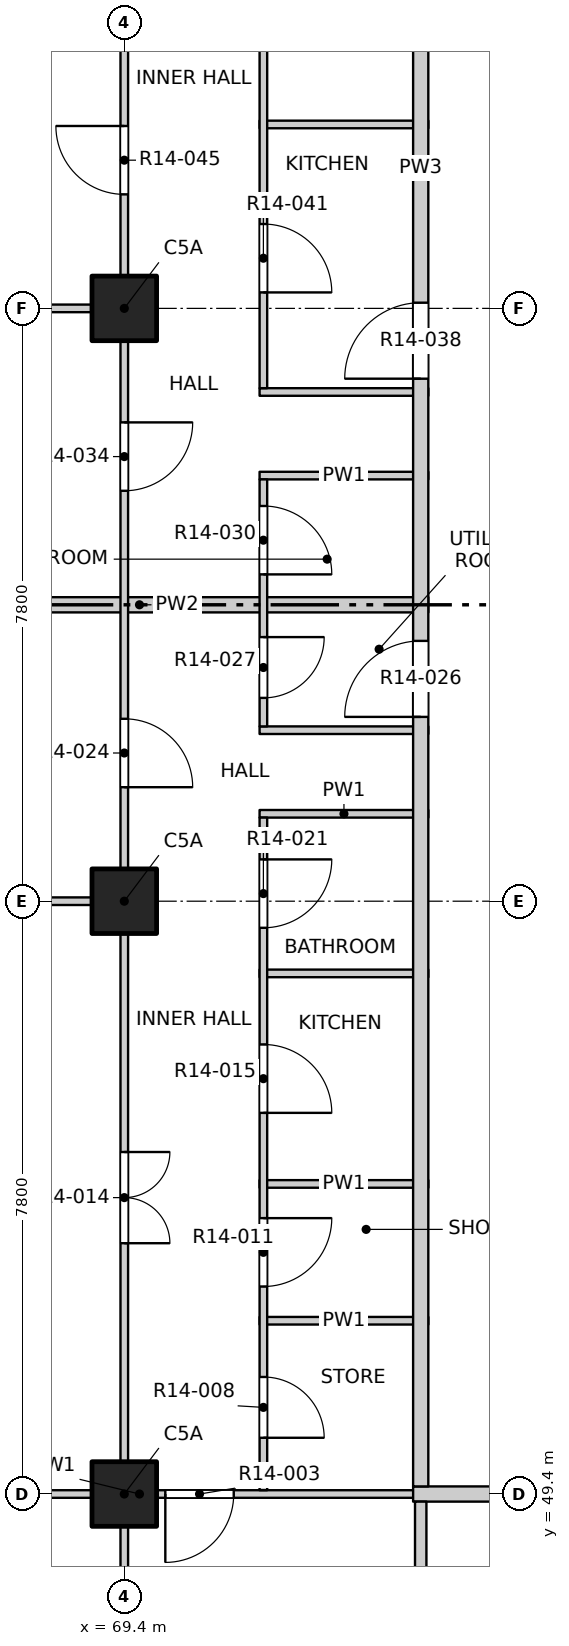
"""IFC4 building model, lengths in metres.
Left out: names, types, materials, properties, quantities, classifications, styles, units other than length and angle.
Written with IfcOpenShell. Run it as: python <this file> out.ifc"""

import sys

from ifc_helpers import new_model, si_unit, direction, frame, frame_2d, origin, origin_2d, place, context, subcontext, project, spatial, rectangle, extrude, element, fill, save


model = new_model("IFC4")
c1 = context("Model", 3, precision=1e-05, world=origin(), true_north=direction((0.0, 1.0)))
c2 = subcontext(c1, "Body", "Model", "MODEL_VIEW")
j1 = project(units=[si_unit("LENGTHUNIT", "METRE"), si_unit("PLANEANGLEUNIT", "RADIAN")], contexts=[c1])
p1 = place(None, origin())
s1 = spatial("IfcSite", under=j1, at=p1, CompositionType="ELEMENT")
p2 = place(p1, origin())
s2 = spatial("IfcBuilding", under=s1, at=p2, CompositionType="ELEMENT")
p3 = place(p2, frame((0.0, 0.0, 148.6)))
s3 = spatial("IfcBuildingStorey", under=s2, at=p3, CompositionType="ELEMENT", Elevation=148.6)
for number, where, z_axis, x_axis in (
    (1, (69.4, 49.4, -0.3), (0.0, 0.0, 1.0), (1.0, 0.0, 0.0)),
    (2, (69.4, 57.2, -0.3), (0.0, 0.0, 1.0), (1.0, 0.0, 0.0)),
    (3, (69.4, 65.0, -0.3), (0.0, 0.0, 1.0), (1.0, 0.0, 0.0)),
):
    element("IfcColumn", number, at=place(p3, frame(where, z_axis=z_axis, x_axis=x_axis)), inside=s3, PredefinedType="COLUMN", context=c2, shape_type="SweptSolid", body=[
        extrude(rectangle(XDim=0.85, YDim=0.85, at=origin_2d()), origin(), (0.0, 0.0, 1.0), 3.45),
    ])
p4 = place(p3, frame((65.8, 49.4, 0.0), z_axis=(0.0, 0.0, 1.0), x_axis=(1.0, 0.0, 0.0)))
e4 = element("IfcWall", 4, at=p4, inside=s3, PredefinedType="PARTITIONING", context=c2, shape_type="SweptSolid", body=[
    extrude(rectangle(XDim=7.6, YDim=0.1, at=frame_2d((3.8, 0.0))), origin(), (0.0, 0.0, 1.0), 3.15),
])
p5 = place(p4, frame((4.14, 0.0, 0.0)))
e5 = element("IfcOpeningElement", 5, at=p5, cuts=e4, PredefinedType="OPENING", context=c2, shape_type="SweptSolid", body=[
    extrude(rectangle(XDim=0.9, YDim=2.1, at=frame_2d((0.45, 1.05))), frame((0.0, 0.06, 0.0), z_axis=(0.0, -1.0, 0.0), x_axis=(1.0, 0.0, 0.0)), (0.0, 0.0, 1.0), 0.12),
])
p6 = place(p3, frame((73.2, 49.4, 0.0), z_axis=(0.0, 0.0, 1.0), x_axis=(1.0, 0.0, 0.0)))
e6 = element("IfcWall", 6, at=p6, inside=s3, PredefinedType="PARTITIONING", context=c2, shape_type="SweptSolid", body=[
    extrude(rectangle(XDim=23.6, YDim=0.2, at=frame_2d((11.8, 0.0))), origin(), (0.0, 0.0, 1.0), 3.15),
])
p7 = place(p6, frame((4.525, 0.0, 0.0)))
e7 = element("IfcOpeningElement", 7, at=p7, cuts=e6, PredefinedType="OPENING", context=c2, shape_type="SweptSolid", body=[
    extrude(rectangle(XDim=1.2, YDim=2.1, at=frame_2d((0.6, 1.05))), frame((0.0, 0.11, 0.0), z_axis=(0.0, -1.0, 0.0), x_axis=(1.0, 0.0, 0.0)), (0.0, 0.0, 1.0), 0.22),
])
p8 = place(p6, frame((12.325, 0.0, 0.0)))
e8 = element("IfcOpeningElement", 8, at=p8, cuts=e6, PredefinedType="OPENING", context=c2, shape_type="SweptSolid", body=[
    extrude(rectangle(XDim=1.2, YDim=2.1, at=frame_2d((0.6, 1.05))), frame((0.0, 0.11, 0.0), z_axis=(0.0, -1.0, 0.0), x_axis=(1.0, 0.0, 0.0)), (0.0, 0.0, 1.0), 0.22),
])
p9 = place(p6, frame((20.125, 0.0, 0.0)))
e9 = element("IfcOpeningElement", 9, at=p9, cuts=e6, PredefinedType="OPENING", context=c2, shape_type="SweptSolid", body=[
    extrude(rectangle(XDim=1.2, YDim=2.1, at=frame_2d((0.6, 1.05))), frame((0.0, 0.11, 0.0), z_axis=(0.0, -1.0, 0.0), x_axis=(1.0, 0.0, 0.0)), (0.0, 0.0, 1.0), 0.22),
])
for number, where, z_axis, x_axis in (
    (10, (71.18, 51.68, 0.0), (0.0, 0.0, 1.0), (1.0, 0.0, 0.0)),
    (11, (71.18, 53.48, 0.0), (0.0, 0.0, 1.0), (1.0, 0.0, 0.0)),
    (12, (71.18, 56.25, 0.0), (0.0, 0.0, 1.0), (1.0, 0.0, 0.0)),
):
    element("IfcWall", number, at=place(p3, frame(where, z_axis=z_axis, x_axis=x_axis)), inside=s3, PredefinedType="PARTITIONING", context=c2, shape_type="SweptSolid", body=[
        extrude(rectangle(XDim=2.22, YDim=0.1, at=frame_2d((1.11, 0.0))), origin(), (0.0, 0.0, 1.0), 3.15),
    ])
p10 = place(p3, frame((65.8, 57.2, 0.0), z_axis=(0.0, 0.0, 1.0), x_axis=(1.0, 0.0, 0.0)))
e13 = element("IfcWall", 13, at=p10, inside=s3, PredefinedType="PARTITIONING", context=c2, shape_type="SweptSolid", body=[
    extrude(rectangle(XDim=3.65, YDim=0.1, at=frame_2d((1.825, 0.0))), origin(), (0.0, 0.0, 1.0), 3.15),
])
for number, where, z_axis, x_axis in (
    (14, (71.18, 58.35, 0.0), (0.0, 0.0, 1.0), (1.0, 0.0, 0.0)),
    (15, (71.18, 59.45, 0.0), (0.0, 0.0, 1.0), (1.0, 0.0, 0.0)),
):
    element("IfcWall", number, at=place(p3, frame(where, z_axis=z_axis, x_axis=x_axis)), inside=s3, PredefinedType="PARTITIONING", context=c2, shape_type="SweptSolid", body=[
        extrude(rectangle(XDim=2.22, YDim=0.1, at=frame_2d((1.11, 0.0))), origin(), (0.0, 0.0, 1.0), 3.15),
    ])
p11 = place(p3, frame((65.8, 61.1, 0.0), z_axis=(0.0, 0.0, 1.0), x_axis=(1.0, 0.0, 0.0)))
e16 = element("IfcWall", 16, at=p11, inside=s3, PredefinedType="PARTITIONING", context=c2, shape_type="SweptSolid", body=[
    extrude(rectangle(XDim=7.6, YDim=0.2, at=frame_2d((3.8, 0.0))), origin(), (0.0, 0.0, 1.0), 2.55),
])
for number, where, z_axis, x_axis in (
    (17, (71.18, 62.8, 0.0), (0.0, 0.0, 1.0), (1.0, 0.0, 0.0)),
    (18, (71.18, 63.9, 0.0), (0.0, 0.0, 1.0), (1.0, 0.0, 0.0)),
):
    element("IfcWall", number, at=place(p3, frame(where, z_axis=z_axis, x_axis=x_axis)), inside=s3, PredefinedType="PARTITIONING", context=c2, shape_type="SweptSolid", body=[
        extrude(rectangle(XDim=2.22, YDim=0.1, at=frame_2d((1.11, 0.0))), origin(), (0.0, 0.0, 1.0), 3.15),
    ])
p12 = place(p3, frame((65.8, 65.0, 0.0), z_axis=(0.0, 0.0, 1.0), x_axis=(1.0, 0.0, 0.0)))
e19 = element("IfcWall", 19, at=p12, inside=s3, PredefinedType="PARTITIONING", context=c2, shape_type="SweptSolid", body=[
    extrude(rectangle(XDim=3.65, YDim=0.1, at=frame_2d((1.825, 0.0))), origin(), (0.0, 0.0, 1.0), 3.15),
])
p13 = place(p3, frame((71.18, 67.42, 0.0), z_axis=(0.0, 0.0, 1.0), x_axis=(1.0, 0.0, 0.0)))
e20 = element("IfcWall", 20, at=p13, inside=s3, PredefinedType="PARTITIONING", context=c2, shape_type="SweptSolid", body=[
    extrude(rectangle(XDim=2.22, YDim=0.1, at=frame_2d((1.11, 0.0))), origin(), (0.0, 0.0, 1.0), 3.15),
])
p14 = place(p3, frame((69.4, 45.8, 0.0), z_axis=(0.0, 0.0, 1.0), x_axis=(0.0, 1.0, 0.0)))
e21 = element("IfcWall", 21, at=p14, inside=s3, PredefinedType="PARTITIONING", context=c2, shape_type="SweptSolid", body=[
    extrude(rectangle(XDim=38.4, YDim=0.1, at=frame_2d((19.2, 0.0))), origin(), (0.0, 0.0, 1.0), 3.15),
])
p15 = place(p14, frame((1.05, 0.0, 0.0)))
e22 = element("IfcOpeningElement", 22, at=p15, cuts=e21, PredefinedType="OPENING", context=c2, shape_type="SweptSolid", body=[
    extrude(rectangle(XDim=1.2, YDim=2.1, at=frame_2d((0.6, 1.05))), frame((0.0, 0.06, 0.0), z_axis=(0.0, -1.0, 0.0), x_axis=(1.0, 0.0, 0.0)), (0.0, 0.0, 1.0), 0.12),
])
p16 = place(p14, frame((6.9, 0.0, 0.0)))
e23 = element("IfcOpeningElement", 23, at=p16, cuts=e21, PredefinedType="OPENING", context=c2, shape_type="SweptSolid", body=[
    extrude(rectangle(XDim=1.2, YDim=2.1, at=frame_2d((0.6, 1.05))), frame((0.0, 0.06, 0.0), z_axis=(0.0, -1.0, 0.0), x_axis=(1.0, 0.0, 0.0)), (0.0, 0.0, 1.0), 0.12),
])
p17 = place(p14, frame((12.9, 0.0, 0.0)))
e24 = element("IfcOpeningElement", 24, at=p17, cuts=e21, PredefinedType="OPENING", context=c2, shape_type="SweptSolid", body=[
    extrude(rectangle(XDim=0.9, YDim=2.1, at=frame_2d((0.45, 1.05))), frame((0.0, 0.06, 0.0), z_axis=(0.0, -1.0, 0.0), x_axis=(1.0, 0.0, 0.0)), (0.0, 0.0, 1.0), 0.12),
])
p18 = place(p14, frame((16.8, 0.0, 0.0)))
e25 = element("IfcOpeningElement", 25, at=p18, cuts=e21, PredefinedType="OPENING", context=c2, shape_type="SweptSolid", body=[
    extrude(rectangle(XDim=0.9, YDim=2.1, at=frame_2d((0.45, 1.05))), frame((0.0, 0.06, 0.0), z_axis=(0.0, -1.0, 0.0), x_axis=(1.0, 0.0, 0.0)), (0.0, 0.0, 1.0), 0.12),
])
p19 = place(p14, frame((20.7, 0.0, 0.0)))
e26 = element("IfcOpeningElement", 26, at=p19, cuts=e21, PredefinedType="OPENING", context=c2, shape_type="SweptSolid", body=[
    extrude(rectangle(XDim=0.9, YDim=2.1, at=frame_2d((0.45, 1.05))), frame((0.0, 0.06, 0.0), z_axis=(0.0, -1.0, 0.0), x_axis=(1.0, 0.0, 0.0)), (0.0, 0.0, 1.0), 0.12),
])
p20 = place(p14, frame((24.6, 0.0, 0.0)))
e27 = element("IfcOpeningElement", 27, at=p20, cuts=e21, PredefinedType="OPENING", context=c2, shape_type="SweptSolid", body=[
    extrude(rectangle(XDim=0.9, YDim=2.1, at=frame_2d((0.45, 1.05))), frame((0.0, 0.06, 0.0), z_axis=(0.0, -1.0, 0.0), x_axis=(1.0, 0.0, 0.0)), (0.0, 0.0, 1.0), 0.12),
])
p21 = place(p14, frame((28.5, 0.0, 0.0)))
e28 = element("IfcOpeningElement", 28, at=p21, cuts=e21, PredefinedType="OPENING", context=c2, shape_type="SweptSolid", body=[
    extrude(rectangle(XDim=0.9, YDim=2.1, at=frame_2d((0.45, 1.05))), frame((0.0, 0.06, 0.0), z_axis=(0.0, -1.0, 0.0), x_axis=(1.0, 0.0, 0.0)), (0.0, 0.0, 1.0), 0.12),
])
p22 = place(p14, frame((32.4, 0.0, 0.0)))
e29 = element("IfcOpeningElement", 29, at=p22, cuts=e21, PredefinedType="OPENING", context=c2, shape_type="SweptSolid", body=[
    extrude(rectangle(XDim=0.9, YDim=2.1, at=frame_2d((0.45, 1.05))), frame((0.0, 0.06, 0.0), z_axis=(0.0, -1.0, 0.0), x_axis=(1.0, 0.0, 0.0)), (0.0, 0.0, 1.0), 0.12),
])
p23 = place(p14, frame((36.15, 0.0, 0.0)))
e30 = element("IfcOpeningElement", 30, at=p23, cuts=e21, PredefinedType="OPENING", context=c2, shape_type="SweptSolid", body=[
    extrude(rectangle(XDim=1.2, YDim=2.1, at=frame_2d((0.6, 1.05))), frame((0.0, 0.06, 0.0), z_axis=(0.0, -1.0, 0.0), x_axis=(1.0, 0.0, 0.0)), (0.0, 0.0, 1.0), 0.12),
])
p24 = place(p3, frame((71.23, 49.45, 0.0), z_axis=(0.0, 0.0, 1.0), x_axis=(0.0, 1.0, 0.0)))
e31 = element("IfcWall", 31, at=p24, inside=s3, PredefinedType="PARTITIONING", context=c2, shape_type="SweptSolid", body=[
    extrude(rectangle(XDim=8.85, YDim=0.1, at=frame_2d((4.425, 0.0))), origin(), (0.0, 0.0, 1.0), 3.15),
])
p25 = place(p24, frame((0.69, 0.0, 0.0)))
e32 = element("IfcOpeningElement", 32, at=p25, cuts=e31, PredefinedType="OPENING", context=c2, shape_type="SweptSolid", body=[
    extrude(rectangle(XDim=0.8, YDim=2.1, at=frame_2d((0.4, 1.05))), frame((0.0, 0.06, 0.0), z_axis=(0.0, -1.0, 0.0), x_axis=(1.0, 0.0, 0.0)), (0.0, 0.0, 1.0), 0.12),
])
p26 = place(p24, frame((2.68, 0.0, 0.0)))
e33 = element("IfcOpeningElement", 33, at=p26, cuts=e31, PredefinedType="OPENING", context=c2, shape_type="SweptSolid", body=[
    extrude(rectangle(XDim=0.9, YDim=2.1, at=frame_2d((0.45, 1.05))), frame((0.0, 0.06, 0.0), z_axis=(0.0, -1.0, 0.0), x_axis=(1.0, 0.0, 0.0)), (0.0, 0.0, 1.0), 0.12),
])
p27 = place(p24, frame((4.965, 0.0, 0.0)))
e34 = element("IfcOpeningElement", 34, at=p27, cuts=e31, PredefinedType="OPENING", context=c2, shape_type="SweptSolid", body=[
    extrude(rectangle(XDim=0.9, YDim=2.1, at=frame_2d((0.45, 1.05))), frame((0.0, 0.06, 0.0), z_axis=(0.0, -1.0, 0.0), x_axis=(1.0, 0.0, 0.0)), (0.0, 0.0, 1.0), 0.12),
])
p28 = place(p24, frame((7.4, 0.0, 0.0)))
e35 = element("IfcOpeningElement", 35, at=p28, cuts=e31, PredefinedType="OPENING", context=c2, shape_type="SweptSolid", body=[
    extrude(rectangle(XDim=0.9, YDim=2.1, at=frame_2d((0.45, 1.05))), frame((0.0, 0.06, 0.0), z_axis=(0.0, -1.0, 0.0), x_axis=(1.0, 0.0, 0.0)), (0.0, 0.0, 1.0), 0.12),
])
p29 = place(p3, frame((71.23, 59.5, 0.0), z_axis=(0.0, 0.0, 1.0), x_axis=(0.0, 1.0, 0.0)))
e36 = element("IfcWall", 36, at=p29, inside=s3, PredefinedType="PARTITIONING", context=c2, shape_type="SweptSolid", body=[
    extrude(rectangle(XDim=3.25, YDim=0.1, at=frame_2d((1.625, 0.0))), origin(), (0.0, 0.0, 1.0), 3.15),
])
p30 = place(p29, frame((0.375, 0.0, 0.0)))
e37 = element("IfcOpeningElement", 37, at=p30, cuts=e36, PredefinedType="OPENING", context=c2, shape_type="SweptSolid", body=[
    extrude(rectangle(XDim=0.8, YDim=2.1, at=frame_2d((0.4, 1.05))), frame((0.0, 0.06, 0.0), z_axis=(0.0, -1.0, 0.0), x_axis=(1.0, 0.0, 0.0)), (0.0, 0.0, 1.0), 0.12),
])
p31 = place(p29, frame((2.0, 0.0, 0.0)))
e38 = element("IfcOpeningElement", 38, at=p31, cuts=e36, PredefinedType="OPENING", context=c2, shape_type="SweptSolid", body=[
    extrude(rectangle(XDim=0.9, YDim=2.1, at=frame_2d((0.45, 1.05))), frame((0.0, 0.06, 0.0), z_axis=(0.0, -1.0, 0.0), x_axis=(1.0, 0.0, 0.0)), (0.0, 0.0, 1.0), 0.12),
])
p32 = place(p3, frame((71.23, 63.95, 0.0), z_axis=(0.0, 0.0, 1.0), x_axis=(0.0, 1.0, 0.0)))
e39 = element("IfcWall", 39, at=p32, inside=s3, PredefinedType="PARTITIONING", context=c2, shape_type="SweptSolid", body=[
    extrude(rectangle(XDim=10.8, YDim=0.1, at=frame_2d((5.4, 0.0))), origin(), (0.0, 0.0, 1.0), 3.15),
])
p33 = place(p32, frame((1.26, 0.0, 0.0)))
e40 = element("IfcOpeningElement", 40, at=p33, cuts=e39, PredefinedType="OPENING", context=c2, shape_type="SweptSolid", body=[
    extrude(rectangle(XDim=0.9, YDim=2.1, at=frame_2d((0.45, 1.05))), frame((0.0, 0.06, 0.0), z_axis=(0.0, -1.0, 0.0), x_axis=(1.0, 0.0, 0.0)), (0.0, 0.0, 1.0), 0.12),
])
p34 = place(p32, frame((4.52, 0.0, 0.0)))
e41 = element("IfcOpeningElement", 41, at=p34, cuts=e39, PredefinedType="OPENING", context=c2, shape_type="SweptSolid", body=[
    extrude(rectangle(XDim=0.8, YDim=2.1, at=frame_2d((0.4, 1.05))), frame((0.0, 0.06, 0.0), z_axis=(0.0, -1.0, 0.0), x_axis=(1.0, 0.0, 0.0)), (0.0, 0.0, 1.0), 0.12),
])
p35 = place(p32, frame((7.16, 0.0, 0.0)))
e42 = element("IfcOpeningElement", 42, at=p35, cuts=e39, PredefinedType="OPENING", context=c2, shape_type="SweptSolid", body=[
    extrude(rectangle(XDim=0.9, YDim=2.1, at=frame_2d((0.45, 1.05))), frame((0.0, 0.06, 0.0), z_axis=(0.0, -1.0, 0.0), x_axis=(1.0, 0.0, 0.0)), (0.0, 0.0, 1.0), 0.12),
])
p36 = place(p32, frame((9.4, 0.0, 0.0)))
e43 = element("IfcOpeningElement", 43, at=p36, cuts=e39, PredefinedType="OPENING", context=c2, shape_type="SweptSolid", body=[
    extrude(rectangle(XDim=0.9, YDim=2.1, at=frame_2d((0.45, 1.05))), frame((0.0, 0.06, 0.0), z_axis=(0.0, -1.0, 0.0), x_axis=(1.0, 0.0, 0.0)), (0.0, 0.0, 1.0), 0.12),
])
p37 = place(p3, frame((73.3, 45.8, 0.0), z_axis=(0.0, 0.0, 1.0), x_axis=(0.0, 1.0, 0.0)))
e44 = element("IfcWall", 44, at=p37, inside=s3, PredefinedType="PARTITIONING", context=c2, shape_type="SweptSolid", body=[
    extrude(rectangle(XDim=3.5, YDim=0.15, at=frame_2d((1.75, 0.0))), origin(), (0.0, 0.0, 1.0), 3.15),
])
p38 = place(p3, frame((73.3, 49.5, 0.0), z_axis=(0.0, 0.0, 1.0), x_axis=(0.0, 1.0, 0.0)))
e45 = element("IfcWall", 45, at=p38, inside=s3, PredefinedType="PARTITIONING", context=c2, shape_type="SweptSolid", body=[
    extrude(rectangle(XDim=34.7, YDim=0.2, at=frame_2d((17.35, 0.0))), origin(), (0.0, 0.0, 1.0), 3.15),
])
p39 = place(p38, frame((10.125, 0.0, 0.0)))
e46 = element("IfcOpeningElement", 46, at=p39, cuts=e45, PredefinedType="OPENING", context=c2, shape_type="SweptSolid", body=[
    extrude(rectangle(XDim=1.0, YDim=2.1, at=frame_2d((0.5, 1.05))), frame((0.0, 0.11, 0.0), z_axis=(0.0, -1.0, 0.0), x_axis=(1.0, 0.0, 0.0)), (0.0, 0.0, 1.0), 0.22),
])
p40 = place(p38, frame((14.575, 0.0, 0.0)))
e47 = element("IfcOpeningElement", 47, at=p40, cuts=e45, PredefinedType="OPENING", context=c2, shape_type="SweptSolid", body=[
    extrude(rectangle(XDim=1.0, YDim=2.1, at=frame_2d((0.5, 1.05))), frame((0.0, 0.11, 0.0), z_axis=(0.0, -1.0, 0.0), x_axis=(1.0, 0.0, 0.0)), (0.0, 0.0, 1.0), 0.22),
])
p41 = place(p38, frame((26.575, 0.0, 0.0)))
e48 = element("IfcOpeningElement", 48, at=p41, cuts=e45, PredefinedType="OPENING", context=c2, shape_type="SweptSolid", body=[
    extrude(rectangle(XDim=1.0, YDim=2.1, at=frame_2d((0.5, 1.05))), frame((0.0, 0.11, 0.0), z_axis=(0.0, -1.0, 0.0), x_axis=(1.0, 0.0, 0.0)), (0.0, 0.0, 1.0), 0.22),
])
p42 = place(p5, origin())
e49 = element("IfcDoor", 49, at=p42, inside=s3, OperationType="SINGLE_SWING_RIGHT", PredefinedType="DOOR", context=c2, shape_type="SweptSolid", body=[
    extrude(rectangle(XDim=0.9, YDim=2.1, at=frame_2d((0.45, 1.05))), frame((0.0, 0.025, 0.0), z_axis=(0.0, -1.0, 0.0), x_axis=(1.0, 0.0, 0.0)), (0.0, 0.0, 1.0), 0.05),
])
fill(e5, e49)
p43 = place(p25, origin())
e50 = element("IfcDoor", 50, at=p43, inside=s3, OperationType="SINGLE_SWING_RIGHT", PredefinedType="DOOR", context=c2, shape_type="SweptSolid", body=[
    extrude(rectangle(XDim=0.8, YDim=2.1, at=frame_2d((0.4, 1.05))), frame((0.0, 0.025, 0.0), z_axis=(0.0, -1.0, 0.0), x_axis=(1.0, 0.0, 0.0)), (0.0, 0.0, 1.0), 0.05),
])
fill(e32, e50)
p44 = place(p26, origin())
e51 = element("IfcDoor", 51, at=p44, inside=s3, OperationType="SINGLE_SWING_LEFT", PredefinedType="DOOR", context=c2, shape_type="SweptSolid", body=[
    extrude(rectangle(XDim=0.9, YDim=2.1, at=frame_2d((0.45, 1.05))), frame((0.0, 0.025, 0.0), z_axis=(0.0, -1.0, 0.0), x_axis=(1.0, 0.0, 0.0)), (0.0, 0.0, 1.0), 0.05),
])
fill(e33, e51)
p45 = place(p16, origin())
e52 = element("IfcDoor", 52, at=p45, inside=s3, OperationType="DOUBLE_DOOR_SINGLE_SWING", PredefinedType="DOOR", context=c2, shape_type="SweptSolid", body=[
    extrude(rectangle(XDim=1.2, YDim=2.1, at=frame_2d((0.6, 1.05))), frame((0.0, 0.025, 0.0), z_axis=(0.0, -1.0, 0.0), x_axis=(1.0, 0.0, 0.0)), (0.0, 0.0, 1.0), 0.05),
])
fill(e23, e52)
p46 = place(p27, origin())
e53 = element("IfcDoor", 53, at=p46, inside=s3, OperationType="SINGLE_SWING_RIGHT", PredefinedType="DOOR", context=c2, shape_type="SweptSolid", body=[
    extrude(rectangle(XDim=0.9, YDim=2.1, at=frame_2d((0.45, 1.05))), frame((0.0, 0.025, 0.0), z_axis=(0.0, -1.0, 0.0), x_axis=(1.0, 0.0, 0.0)), (0.0, 0.0, 1.0), 0.05),
])
fill(e34, e53)
p47 = place(p28, origin())
e54 = element("IfcDoor", 54, at=p47, inside=s3, OperationType="SINGLE_SWING_LEFT", PredefinedType="DOOR", context=c2, shape_type="SweptSolid", body=[
    extrude(rectangle(XDim=0.9, YDim=2.1, at=frame_2d((0.45, 1.05))), frame((0.0, 0.025, 0.0), z_axis=(0.0, -1.0, 0.0), x_axis=(1.0, 0.0, 0.0)), (0.0, 0.0, 1.0), 0.05),
])
fill(e35, e54)
p48 = place(p17, origin())
e55 = element("IfcDoor", 55, at=p48, inside=s3, OperationType="SINGLE_SWING_RIGHT", PredefinedType="DOOR", context=c2, shape_type="SweptSolid", body=[
    extrude(rectangle(XDim=0.9, YDim=2.1, at=frame_2d((0.45, 1.05))), frame((0.0, 0.025, 0.0), z_axis=(0.0, -1.0, 0.0), x_axis=(1.0, 0.0, 0.0)), (0.0, 0.0, 1.0), 0.05),
])
fill(e24, e55)
p49 = place(p39, origin())
e56 = element("IfcDoor", 56, at=p49, inside=s3, OperationType="SINGLE_SWING_RIGHT", PredefinedType="DOOR", context=c2, shape_type="SweptSolid", body=[
    extrude(rectangle(XDim=1.0, YDim=2.1, at=frame_2d((0.5, 1.05))), frame((0.0, 0.025, 0.0), z_axis=(0.0, -1.0, 0.0), x_axis=(1.0, 0.0, 0.0)), (0.0, 0.0, 1.0), 0.05),
])
fill(e46, e56)
p50 = place(p30, origin())
e57 = element("IfcDoor", 57, at=p50, inside=s3, OperationType="SINGLE_SWING_LEFT", PredefinedType="DOOR", context=c2, shape_type="SweptSolid", body=[
    extrude(rectangle(XDim=0.8, YDim=2.1, at=frame_2d((0.4, 1.05))), frame((0.0, 0.025, 0.0), z_axis=(0.0, -1.0, 0.0), x_axis=(1.0, 0.0, 0.0)), (0.0, 0.0, 1.0), 0.05),
])
fill(e37, e57)
p51 = place(p31, origin())
e58 = element("IfcDoor", 58, at=p51, inside=s3, OperationType="SINGLE_SWING_RIGHT", PredefinedType="DOOR", context=c2, shape_type="SweptSolid", body=[
    extrude(rectangle(XDim=0.9, YDim=2.1, at=frame_2d((0.45, 1.05))), frame((0.0, 0.025, 0.0), z_axis=(0.0, -1.0, 0.0), x_axis=(1.0, 0.0, 0.0)), (0.0, 0.0, 1.0), 0.05),
])
fill(e38, e58)
p52 = place(p18, origin())
e59 = element("IfcDoor", 59, at=p52, inside=s3, OperationType="SINGLE_SWING_LEFT", PredefinedType="DOOR", context=c2, shape_type="SweptSolid", body=[
    extrude(rectangle(XDim=0.9, YDim=2.1, at=frame_2d((0.45, 1.05))), frame((0.0, 0.025, 0.0), z_axis=(0.0, -1.0, 0.0), x_axis=(1.0, 0.0, 0.0)), (0.0, 0.0, 1.0), 0.05),
])
fill(e25, e59)
p53 = place(p40, origin())
e60 = element("IfcDoor", 60, at=p53, inside=s3, OperationType="SINGLE_SWING_RIGHT", PredefinedType="DOOR", context=c2, shape_type="SweptSolid", body=[
    extrude(rectangle(XDim=1.0, YDim=2.1, at=frame_2d((0.5, 1.05))), frame((0.0, 0.025, 0.0), z_axis=(0.0, -1.0, 0.0), x_axis=(1.0, 0.0, 0.0)), (0.0, 0.0, 1.0), 0.05),
])
fill(e47, e60)
p54 = place(p33, origin())
e61 = element("IfcDoor", 61, at=p54, inside=s3, OperationType="SINGLE_SWING_RIGHT", PredefinedType="DOOR", context=c2, shape_type="SweptSolid", body=[
    extrude(rectangle(XDim=0.9, YDim=2.1, at=frame_2d((0.45, 1.05))), frame((0.0, 0.025, 0.0), z_axis=(0.0, -1.0, 0.0), x_axis=(1.0, 0.0, 0.0)), (0.0, 0.0, 1.0), 0.05),
])
fill(e40, e61)
p55 = place(p19, origin())
e62 = element("IfcDoor", 62, at=p55, inside=s3, OperationType="SINGLE_SWING_RIGHT", PredefinedType="DOOR", context=c2, shape_type="SweptSolid", body=[
    extrude(rectangle(XDim=0.9, YDim=2.1, at=frame_2d((0.45, 1.05))), frame((0.0, 0.025, 0.0), z_axis=(0.0, -1.0, 0.0), x_axis=(1.0, 0.0, 0.0)), (0.0, 0.0, 1.0), 0.05),
])
fill(e26, e62)
save(model, sys.argv[1])
